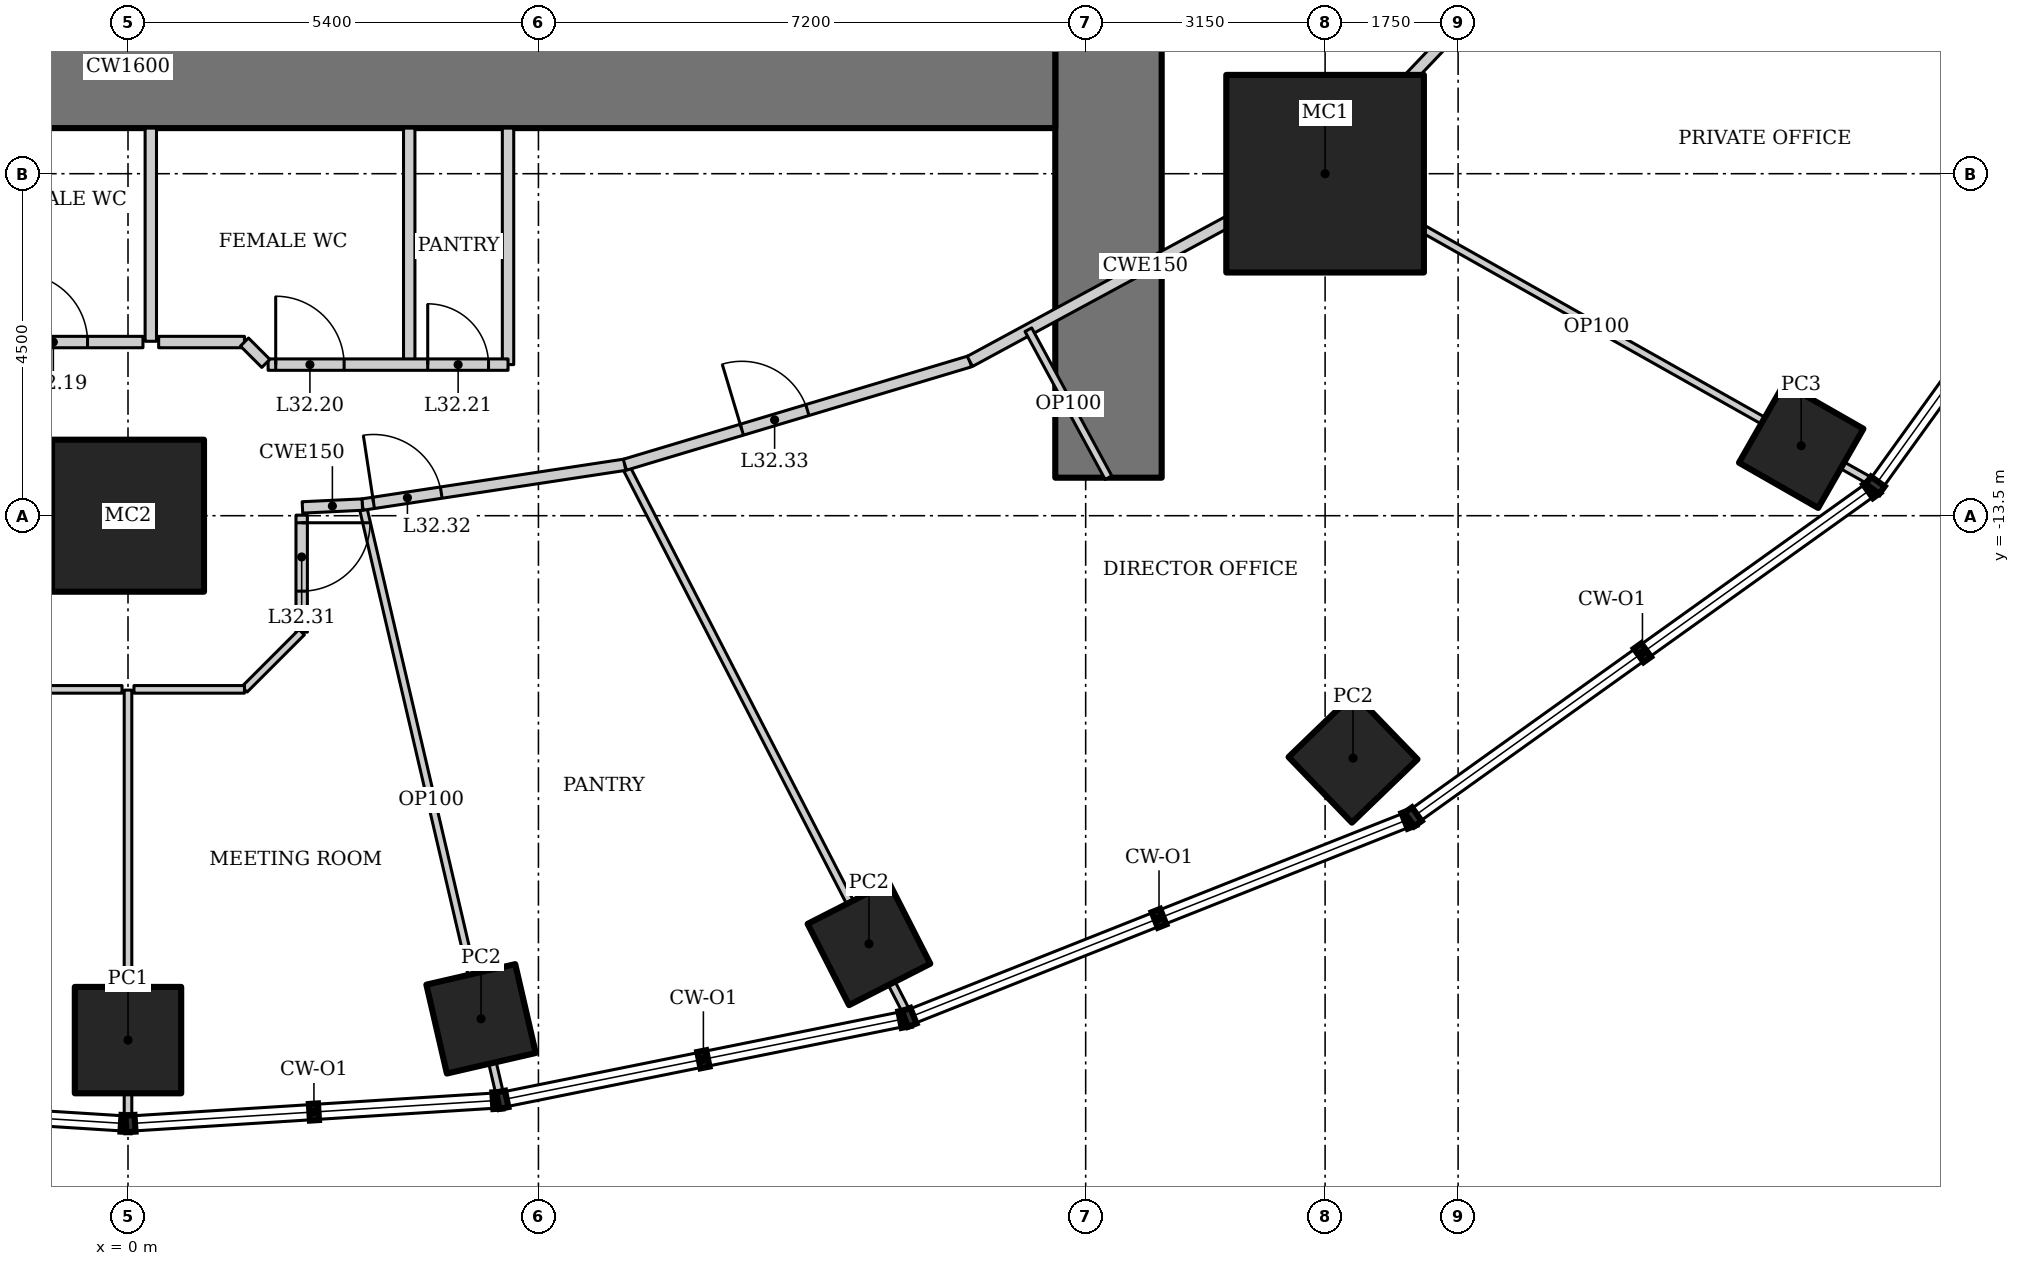
"""IFC4 building model, lengths in metres.
Left out: names, types, materials, properties, quantities, classifications, styles, units other than length and angle.
Written with IfcOpenShell. Run it as: python <this file> out.ifc"""

import sys

from ifc_helpers import new_model, si_unit, direction, frame, frame_2d, origin, origin_2d, place, context, subcontext, project, spatial, rectangle, hollow_rectangle, extrude, element, fill, save


model = new_model("IFC4")
c1 = context("Model", 3, precision=1e-05, world=origin(), true_north=direction((0.0, 1.0)))
c2 = subcontext(c1, "Body", "Model", "MODEL_VIEW")
j1 = project(units=[si_unit("LENGTHUNIT", "METRE"), si_unit("PLANEANGLEUNIT", "RADIAN")], contexts=[c1])
p1 = place(None, origin())
s1 = spatial("IfcSite", under=j1, at=p1, CompositionType="ELEMENT")
p2 = place(p1, origin())
s2 = spatial("IfcBuilding", under=s1, at=p2, CompositionType="ELEMENT")
p3 = place(p2, frame((0.0, 0.0, 138.4)))
s3 = spatial("IfcBuildingStorey", under=s2, at=p3, CompositionType="ELEMENT", Elevation=138.4)
p4 = place(p3, frame((0.0, -13.5, 0.0), z_axis=(0.0, 0.0, 1.0), x_axis=(1.0, 0.0, 0.0)))
e1 = element("IfcColumn", 1, at=p4, inside=s3, PredefinedType="COLUMN", context=c2, shape_type="SweptSolid", body=[
    extrude(hollow_rectangle(XDim=2.0, YDim=2.0, WallThickness=0.17, at=origin_2d()), origin(), (0.0, 0.0, 1.0), 4.2),
])
p5 = place(p3, frame((15.75, -9.0, 0.0), z_axis=(0.0, 0.0, 1.0), x_axis=(1.0, 0.0, 0.0)))
e2 = element("IfcColumn", 2, at=p5, inside=s3, PredefinedType="COLUMN", context=c2, shape_type="SweptSolid", body=[
    extrude(hollow_rectangle(XDim=2.6, YDim=2.6, WallThickness=0.13, at=origin_2d()), origin(), (0.0, 0.0, 1.0), 4.2),
])
p6 = place(p3, frame((0.0, -20.4, 0.0), z_axis=(0.0, 0.0, 1.0), x_axis=(1.0, 0.0, 0.0)))
e3 = element("IfcColumn", 3, at=p6, inside=s3, PredefinedType="COLUMN", context=c2, shape_type="SweptSolid", body=[
    extrude(hollow_rectangle(XDim=1.4, YDim=1.4, WallThickness=0.1, at=origin_2d()), origin(), (0.0, 0.0, 1.0), 4.2),
])
for number, where, z_axis, x_axis in (
    (4, (4.645, -20.12, 0.0), (0.0, 0.0, 1.0), (0.974, 0.225, 0.0)),
    (5, (9.749, -19.133, 0.0), (0.0, 0.0, 1.0), (0.891, 0.454, 0.0)),
    (6, (16.118, -16.69, 0.0), (0.0, 0.0, 1.0), (0.719, 0.695, 0.0)),
):
    element("IfcColumn", number, at=place(p3, frame(where, z_axis=z_axis, x_axis=x_axis)), inside=s3, PredefinedType="COLUMN", context=c2, shape_type="SweptSolid", body=[
        extrude(hollow_rectangle(XDim=1.2, YDim=1.2, WallThickness=0.1, at=origin_2d()), origin(), (0.0, 0.0, 1.0), 4.2),
    ])
p7 = place(p3, frame((22.014, -12.579, 0.0), z_axis=(0.0, 0.0, 1.0), x_axis=(0.496139221777, 0.86824298017, 0.0)))
e7 = element("IfcColumn", 7, at=p7, inside=s3, PredefinedType="COLUMN", context=c2, shape_type="SweptSolid", body=[
    extrude(hollow_rectangle(XDim=1.2, YDim=1.2, WallThickness=0.12, at=origin_2d()), origin(), (0.0, 0.0, 1.0), 4.2),
])
p8 = place(p3, frame((12.9, -13.0, 0.0), z_axis=(0.0, 0.0, 1.0), x_axis=(0.0, 1.0, 0.0)))
e8 = element("IfcWall", 8, at=p8, inside=s3, PredefinedType="SHEAR", context=c2, shape_type="SweptSolid", body=[
    extrude(rectangle(XDim=26.0, YDim=1.4, at=frame_2d((13.0, 0.0))), origin(), (0.0, 0.0, 1.0), 4.2),
])
p9 = place(p8, frame((12.1, 0.0, 0.0)))
e9 = element("IfcOpeningElement", 9, at=p9, cuts=e8, PredefinedType="OPENING", context=c2, shape_type="SweptSolid", body=[
    extrude(rectangle(XDim=1.8, YDim=2.1, at=frame_2d((0.9, 1.05))), frame((0.0, 0.71, 0.0), z_axis=(0.0, -1.0, 0.0), x_axis=(1.0, 0.0, 0.0)), (0.0, 0.0, 1.0), 1.42),
])
p10 = place(p3, frame((-12.2, -7.6, 0.0), z_axis=(0.0, 0.0, 1.0), x_axis=(1.0, 0.0, 0.0)))
e10 = element("IfcWall", 10, at=p10, inside=s3, PredefinedType="SHEAR", context=c2, shape_type="SweptSolid", body=[
    extrude(rectangle(XDim=24.4, YDim=1.6, at=frame_2d((12.2, 0.0))), origin(), (0.0, 0.0, 1.0), 4.2),
])
p11 = place(p3, frame((4.897, -21.135, 0.0), z_axis=(0.0, 0.0, 1.0), x_axis=(-0.227039313577, 0.973885593943, 0.0)))
e11 = element("IfcWall", 11, at=p11, inside=s3, PredefinedType="PARTITIONING", context=c2, shape_type="SweptSolid", body=[
    extrude(rectangle(XDim=7.99, YDim=0.1, at=frame_2d((3.995, 0.0))), origin(), (0.0, 0.0, 1.0), 3.293),
])
p12 = place(p3, frame((10.253, -20.052, 0.0), z_axis=(0.0, 0.0, 1.0), x_axis=(-0.457535449567, 0.889191381194, 0.0)))
e12 = element("IfcWall", 12, at=p12, inside=s3, PredefinedType="PARTITIONING", context=c2, shape_type="SweptSolid", body=[
    extrude(rectangle(XDim=8.123, YDim=0.1, at=frame_2d((4.061, 0.0))), origin(), (0.0, 0.0, 1.0), 3.349),
])
p13 = place(p3, frame((22.949, -13.059, 0.0), z_axis=(0.0, 0.0, 1.0), x_axis=(-0.871079462611, 0.491142107558, 0.0)))
e13 = element("IfcWall", 13, at=p13, inside=s3, PredefinedType="PARTITIONING", context=c2, shape_type="SweptSolid", body=[
    extrude(rectangle(XDim=8.327, YDim=0.1, at=frame_2d((4.164, 0.0))), origin(), (0.0, 0.0, 1.0), 3.451),
])
p14 = place(p3, frame((3.083, -13.354, 0.0), z_axis=(0.0, 0.0, 1.0), x_axis=(0.988668719464, 0.150113833987, 0.0)))
e14 = element("IfcWall", 14, at=p14, inside=s3, PredefinedType="PARTITIONING", context=c2, shape_type="SweptSolid", body=[
    extrude(rectangle(XDim=3.493, YDim=0.15, at=frame_2d((1.747, 0.0))), origin(), (0.0, 0.0, 1.0), 4.05),
])
p15 = place(p14, frame((0.15, 0.0, 0.0)))
e15 = element("IfcOpeningElement", 15, at=p15, cuts=e14, PredefinedType="OPENING", context=c2, shape_type="SweptSolid", body=[
    extrude(rectangle(XDim=0.9, YDim=2.1, at=frame_2d((0.45, 1.05))), frame((0.0, 0.085, 0.0), z_axis=(0.0, -1.0, 0.0), x_axis=(1.0, 0.0, 0.0)), (0.0, 0.0, 1.0), 0.17),
])
p16 = place(p3, frame((6.537, -12.829, 0.0), z_axis=(0.0, 0.0, 1.0), x_axis=(0.957933992798, 0.286988615527, 0.0)))
e16 = element("IfcWall", 16, at=p16, inside=s3, PredefinedType="PARTITIONING", context=c2, shape_type="SweptSolid", body=[
    extrude(rectangle(XDim=4.738, YDim=0.15, at=frame_2d((2.369, 0.0))), origin(), (0.0, 0.0, 1.0), 4.05),
])
p17 = place(p16, frame((1.607, 0.0, 0.0)))
e17 = element("IfcOpeningElement", 17, at=p17, cuts=e16, PredefinedType="OPENING", context=c2, shape_type="SweptSolid", body=[
    extrude(rectangle(XDim=0.9, YDim=2.1, at=frame_2d((0.45, 1.05))), frame((0.0, 0.085, 0.0), z_axis=(0.0, -1.0, 0.0), x_axis=(1.0, 0.0, 0.0)), (0.0, 0.0, 1.0), 0.17),
])
p18 = place(p3, frame((11.076, -11.469, 0.0), z_axis=(0.0, 0.0, 1.0), x_axis=(0.879436285334, 0.476016617397, 0.0)))
e18 = element("IfcWall", 18, at=p18, inside=s3, PredefinedType="PARTITIONING", context=c2, shape_type="SweptSolid", body=[
    extrude(rectangle(XDim=5.253, YDim=0.15, at=frame_2d((2.626, 0.0))), origin(), (0.0, 0.0, 1.0), 4.05),
])
p19 = place(p3, frame((15.696, -8.969, 0.0), z_axis=(0.0, 0.0, 1.0), x_axis=(0.688797257101, 0.72495402517, 0.0)))
e19 = element("IfcWall", 19, at=p19, inside=s3, PredefinedType="PARTITIONING", context=c2, shape_type="SweptSolid", body=[
    extrude(rectangle(XDim=5.638, YDim=0.15, at=frame_2d((2.819, 0.0))), origin(), (0.0, 0.0, 1.0), 4.05),
])
p20 = place(p19, frame((4.588, 0.0, 0.0)))
e20 = element("IfcOpeningElement", 20, at=p20, cuts=e19, PredefinedType="OPENING", context=c2, shape_type="SweptSolid", body=[
    extrude(rectangle(XDim=0.9, YDim=2.1, at=frame_2d((0.45, 1.05))), frame((0.0, 0.085, 0.0), z_axis=(0.0, -1.0, 0.0), x_axis=(1.0, 0.0, 0.0)), (0.0, 0.0, 1.0), 0.17),
])
for number, where, z_axis, x_axis in (
    (21, (5.0, -8.4, 0.0), (0.0, 0.0, 1.0), (0.0, -1.0, 0.0)),
    (22, (3.7, -8.4, 0.0), (0.0, 0.0, 1.0), (0.0, -1.0, 0.0)),
):
    element("IfcWall", number, at=place(p3, frame(where, z_axis=z_axis, x_axis=x_axis)), inside=s3, PredefinedType="SOLIDWALL", context=c2, shape_type="SweptSolid", body=[
        extrude(rectangle(XDim=3.112, YDim=0.15, at=frame_2d((1.556, 0.0))), origin(), (0.0, 0.0, 1.0), 4.05),
    ])
p21 = place(p3, frame((12.9, -13.0, 0.0), z_axis=(0.0, 0.0, 1.0), x_axis=(-0.475998959765, 0.879445842734, 0.0)))
e23 = element("IfcWall", 23, at=p21, inside=s3, PredefinedType="PARTITIONING", context=c2, shape_type="SweptSolid", body=[
    extrude(rectangle(XDim=2.214, YDim=0.1, at=frame_2d((1.107, 0.0))), origin(), (0.0, 0.0, 1.0), 4.05),
])
p22 = place(p3, frame((0.0, -21.445, 0.0), z_axis=(0.0, 0.0, 1.0), x_axis=(0.0, 1.0, 0.0)))
e24 = element("IfcWall", 24, at=p22, inside=s3, PredefinedType="PARTITIONING", context=c2, shape_type="SweptSolid", body=[
    extrude(rectangle(XDim=5.65, YDim=0.1, at=frame_2d((2.825, 0.0))), origin(), (0.0, 0.0, 1.0), 3.646),
])
p23 = place(p3, frame((2.295, -13.391, 0.0), z_axis=(0.0, 0.0, 1.0), x_axis=(0.998878614804, 0.04734461836, 0.0)))
e25 = element("IfcWall", 25, at=p23, inside=s3, PredefinedType="PARTITIONING", context=c2, shape_type="SweptSolid", body=[
    extrude(rectangle(XDim=0.789, YDim=0.15, at=frame_2d((0.395, 0.0))), origin(), (0.0, 0.0, 1.0), 4.05),
])
p24 = place(p3, frame((1.844, -11.512, 0.0), z_axis=(0.0, 0.0, 1.0), x_axis=(1.0, 0.0, 0.0)))
e26 = element("IfcWall", 26, at=p24, inside=s3, PredefinedType="SOLIDWALL", context=c2, shape_type="SweptSolid", body=[
    extrude(rectangle(XDim=3.156, YDim=0.15, at=frame_2d((1.578, 0.0))), origin(), (0.0, 0.0, 1.0), 4.05),
])
p25 = place(p24, frame((0.1, 0.0, 0.0)))
e27 = element("IfcOpeningElement", 27, at=p25, cuts=e26, PredefinedType="OPENING", context=c2, shape_type="SweptSolid", body=[
    extrude(rectangle(XDim=0.9, YDim=2.1, at=frame_2d((0.45, 1.05))), frame((0.0, 0.085, 0.0), z_axis=(0.0, -1.0, 0.0), x_axis=(1.0, 0.0, 0.0)), (0.0, 0.0, 1.0), 0.17),
])
p26 = place(p24, frame((2.1, 0.0, 0.0)))
e28 = element("IfcOpeningElement", 28, at=p26, cuts=e26, PredefinedType="OPENING", context=c2, shape_type="SweptSolid", body=[
    extrude(rectangle(XDim=0.8, YDim=2.1, at=frame_2d((0.4, 1.05))), frame((0.0, 0.085, 0.0), z_axis=(0.0, -1.0, 0.0), x_axis=(1.0, 0.0, 0.0)), (0.0, 0.0, 1.0), 0.17),
])
p27 = place(p3, frame((0.3, -8.4, 0.0), z_axis=(0.0, 0.0, 1.0), x_axis=(0.0, -1.0, 0.0)))
e29 = element("IfcWall", 29, at=p27, inside=s3, PredefinedType="SOLIDWALL", context=c2, shape_type="SweptSolid", body=[
    extrude(rectangle(XDim=2.805, YDim=0.15, at=frame_2d((1.403, 0.0))), origin(), (0.0, 0.0, 1.0), 4.05),
])
p28 = place(p3, frame((-1.532, -11.215, 0.0), z_axis=(0.0, 0.0, 1.0), x_axis=(1.0, 0.0, 0.0)))
e30 = element("IfcWall", 30, at=p28, inside=s3, PredefinedType="SOLIDWALL", context=c2, shape_type="SweptSolid", body=[
    extrude(rectangle(XDim=1.729, YDim=0.15, at=frame_2d((0.865, 0.0))), origin(), (0.0, 0.0, 1.0), 4.05),
])
p29 = place(p28, frame((0.1, 0.0, 0.0)))
e31 = element("IfcOpeningElement", 31, at=p29, cuts=e30, PredefinedType="OPENING", context=c2, shape_type="SweptSolid", body=[
    extrude(rectangle(XDim=0.9, YDim=2.1, at=frame_2d((0.45, 1.05))), frame((0.0, 0.085, 0.0), z_axis=(0.0, -1.0, 0.0), x_axis=(1.0, 0.0, 0.0)), (0.0, 0.0, 1.0), 0.17),
])
p30 = place(p3, frame((0.403, -11.215, 0.0), z_axis=(0.0, 0.0, 1.0), x_axis=(1.0, 0.0, 0.0)))
e32 = element("IfcWall", 32, at=p30, inside=s3, PredefinedType="SOLIDWALL", context=c2, shape_type="SweptSolid", body=[
    extrude(rectangle(XDim=1.129, YDim=0.15, at=frame_2d((0.564, 0.0))), origin(), (0.0, 0.0, 1.0), 4.05),
])
p31 = place(p3, frame((1.532, -11.215, 0.0), z_axis=(0.0, 0.0, 1.0), x_axis=(0.707413751745, -0.706799677308, 0.0)))
e33 = element("IfcWall", 33, at=p31, inside=s3, PredefinedType="SOLIDWALL", context=c2, shape_type="SweptSolid", body=[
    extrude(rectangle(XDim=0.397, YDim=0.15, at=frame_2d((0.199, 0.0))), origin(), (0.0, 0.0, 1.0), 4.05),
])
p32 = place(p3, frame((-0.078, -15.785, 0.0), z_axis=(0.0, 0.0, 1.0), x_axis=(-1.0, 0.0, 0.0)))
e34 = element("IfcWall", 34, at=p32, inside=s3, PredefinedType="PARTITIONING", context=c2, shape_type="SweptSolid", body=[
    extrude(rectangle(XDim=1.454, YDim=0.1, at=frame_2d((0.727, 0.0))), origin(), (0.0, 0.0, 1.0), 4.05),
])
p33 = place(p3, frame((2.285, -13.493, 0.0), z_axis=(0.0, 0.0, 1.0), x_axis=(0.0, -1.0, 0.0)))
e35 = element("IfcWall", 35, at=p33, inside=s3, PredefinedType="PARTITIONING", context=c2, shape_type="SweptSolid", body=[
    extrude(rectangle(XDim=1.54, YDim=0.15, at=frame_2d((0.77, 0.0))), origin(), (0.0, 0.0, 1.0), 4.05),
])
p34 = place(p33, frame((0.1, 0.0, 0.0)))
e36 = element("IfcOpeningElement", 36, at=p34, cuts=e35, PredefinedType="OPENING", context=c2, shape_type="SweptSolid", body=[
    extrude(rectangle(XDim=0.9, YDim=2.1, at=frame_2d((0.45, 1.05))), frame((0.0, 0.085, 0.0), z_axis=(0.0, -1.0, 0.0), x_axis=(1.0, 0.0, 0.0)), (0.0, 0.0, 1.0), 0.17),
])
p35 = place(p3, frame((2.285, -15.032, 0.0), z_axis=(0.0, 0.0, 1.0), x_axis=(-0.707106781187, -0.707106781187, 0.0)))
e37 = element("IfcWall", 37, at=p35, inside=s3, PredefinedType="PARTITIONING", context=c2, shape_type="SweptSolid", body=[
    extrude(rectangle(XDim=1.064, YDim=0.1, at=frame_2d((0.532, 0.0))), origin(), (0.0, 0.0, 1.0), 4.05),
])
p36 = place(p3, frame((1.532, -15.785, 0.0), z_axis=(0.0, 0.0, 1.0), x_axis=(-1.0, 0.0, 0.0)))
e38 = element("IfcWall", 38, at=p36, inside=s3, PredefinedType="PARTITIONING", context=c2, shape_type="SweptSolid", body=[
    extrude(rectangle(XDim=1.454, YDim=0.1, at=frame_2d((0.727, 0.0))), origin(), (0.0, 0.0, 1.0), 4.05),
])
p37 = place(p29, origin())
e39 = element("IfcDoor", 39, at=p37, inside=s3, OperationType="SINGLE_SWING_LEFT", PredefinedType="DOOR", context=c2, shape_type="SweptSolid", body=[
    extrude(rectangle(XDim=0.9, YDim=2.1, at=frame_2d((0.45, 1.05))), frame((0.0, 0.025, 0.0), z_axis=(0.0, -1.0, 0.0), x_axis=(1.0, 0.0, 0.0)), (0.0, 0.0, 1.0), 0.05),
])
fill(e31, e39)
p38 = place(p25, origin())
e40 = element("IfcDoor", 40, at=p38, inside=s3, OperationType="SINGLE_SWING_LEFT", PredefinedType="DOOR", context=c2, shape_type="SweptSolid", body=[
    extrude(rectangle(XDim=0.9, YDim=2.1, at=frame_2d((0.45, 1.05))), frame((0.0, 0.025, 0.0), z_axis=(0.0, -1.0, 0.0), x_axis=(1.0, 0.0, 0.0)), (0.0, 0.0, 1.0), 0.05),
])
fill(e27, e40)
p39 = place(p26, origin())
e41 = element("IfcDoor", 41, at=p39, inside=s3, OperationType="SINGLE_SWING_LEFT", PredefinedType="DOOR", context=c2, shape_type="SweptSolid", body=[
    extrude(rectangle(XDim=0.8, YDim=2.1, at=frame_2d((0.4, 1.05))), frame((0.0, 0.025, 0.0), z_axis=(0.0, -1.0, 0.0), x_axis=(1.0, 0.0, 0.0)), (0.0, 0.0, 1.0), 0.05),
])
fill(e28, e41)
p40 = place(p34, origin())
e42 = element("IfcDoor", 42, at=p40, inside=s3, OperationType="SINGLE_SWING_LEFT", PredefinedType="DOOR", context=c2, shape_type="SweptSolid", body=[
    extrude(rectangle(XDim=0.9, YDim=2.1, at=frame_2d((0.45, 1.05))), frame((0.0, 0.025, 0.0), z_axis=(0.0, -1.0, 0.0), x_axis=(1.0, 0.0, 0.0)), (0.0, 0.0, 1.0), 0.05),
])
fill(e36, e42)
p41 = place(p15, origin())
e43 = element("IfcDoor", 43, at=p41, inside=s3, OperationType="SINGLE_SWING_LEFT", PredefinedType="DOOR", context=c2, shape_type="SweptSolid", body=[
    extrude(rectangle(XDim=0.9, YDim=2.1, at=frame_2d((0.45, 1.05))), frame((0.0, 0.025, 0.0), z_axis=(0.0, -1.0, 0.0), x_axis=(1.0, 0.0, 0.0)), (0.0, 0.0, 1.0), 0.05),
])
fill(e15, e43)
p42 = place(p17, origin())
e44 = element("IfcDoor", 44, at=p42, inside=s3, OperationType="SINGLE_SWING_LEFT", PredefinedType="DOOR", context=c2, shape_type="SweptSolid", body=[
    extrude(rectangle(XDim=0.9, YDim=2.1, at=frame_2d((0.45, 1.05))), frame((0.0, 0.025, 0.0), z_axis=(0.0, -1.0, 0.0), x_axis=(1.0, 0.0, 0.0)), (0.0, 0.0, 1.0), 0.05),
])
fill(e17, e44)
save(model, sys.argv[1])
